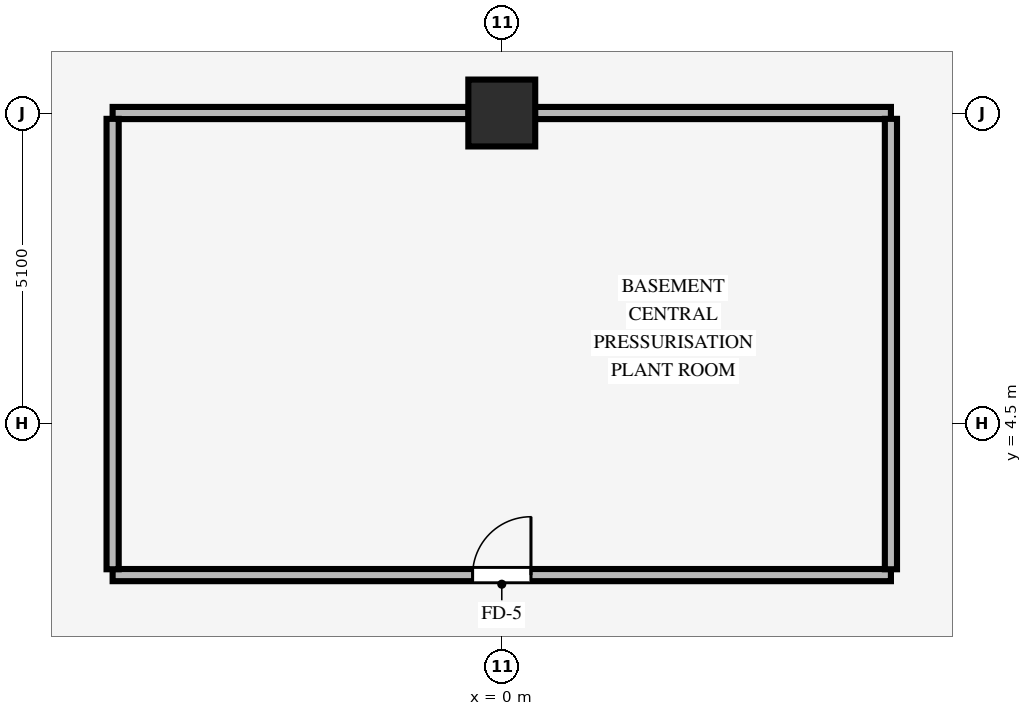
"""IFC4 building model, lengths in metres.
Left out: names, types, materials, properties, quantities, classifications, styles, units other than length and angle.
Written with IfcOpenShell. Run it as: python <this file> out.ifc"""

import sys

from ifc_helpers import new_model, si_unit, direction, frame, frame_2d, origin, origin_2d, place, context, subcontext, project, spatial, rectangle, extrude, source, transform, mapped, element, fill, save


model = new_model("IFC4")
c1 = context("Model", 3, precision=1e-05, world=origin(), true_north=direction((0.0, 1.0)))
c2 = subcontext(c1, "Body", "Model", "MODEL_VIEW")
j1 = project(units=[si_unit("LENGTHUNIT", "METRE"), si_unit("PLANEANGLEUNIT", "RADIAN")], contexts=[c1])
p1 = place(None, origin())
s1 = spatial("IfcSite", under=j1, at=p1, CompositionType="ELEMENT")
p2 = place(p1, origin())
s2 = spatial("IfcBuilding", under=s1, at=p2, CompositionType="ELEMENT")
p3 = place(p2, frame((0.0, 0.0, -8.4)))
s3 = spatial("IfcBuildingStorey", under=s2, at=p3, CompositionType="ELEMENT", Elevation=-8.4)
p4 = place(p3, frame((0.0, 9.6, 0.0), z_axis=(0.0, 0.0, 1.0), x_axis=(1.0, 0.0, 0.0)))
e1 = element("IfcColumn", 1, at=p4, inside=s3, PredefinedType="COLUMN", context=c2, shape_type="SweptSolid", body=[
    extrude(rectangle(XDim=1.1, YDim=1.1, at=origin_2d()), origin(), (0.0, 0.0, 1.0), 3.85),
])
p5 = place(p3, frame((-6.4, 2.0, 0.0), z_axis=(0.0, 0.0, 1.0), x_axis=(1.0, 0.0, 0.0)))
e2 = element("IfcWall", 2, at=p5, inside=s3, PredefinedType="STANDARD", context=c2, shape_type="SweptSolid", body=[
    extrude(rectangle(XDim=12.8, YDim=0.2, at=frame_2d((6.4, 0.0))), origin(), (0.0, 0.0, 1.0), 3.84),
])
p6 = place(p5, frame((5.92, 0.0, 0.0)))
e3 = element("IfcOpeningElement", 3, at=p6, cuts=e2, PredefinedType="OPENING", context=c2, shape_type="SweptSolid", body=[
    extrude(rectangle(XDim=0.96, YDim=2.1, at=frame_2d((0.48, 1.05))), frame((0.0, 0.11, 0.0), z_axis=(0.0, -1.0, 0.0), x_axis=(1.0, 0.0, 0.0)), (0.0, 0.0, 1.0), 0.22),
])
for number, where, z_axis, x_axis in (
    (4, (-6.4, 9.6, 0.0), (0.0, 0.0, 1.0), (1.0, 0.0, 0.0)),
    (5, (0.546, 9.6, 0.0), (0.0, 0.0, 1.0), (1.0, 0.0, 0.0)),
):
    element("IfcWall", number, at=place(p3, frame(where, z_axis=z_axis, x_axis=x_axis)), inside=s3, PredefinedType="STANDARD", context=c2, shape_type="SweptSolid", body=[
        extrude(rectangle(XDim=5.854, YDim=0.2, at=frame_2d((2.927, 0.0))), origin(), (0.0, 0.0, 1.0), 3.085),
    ])
for number, where, z_axis, x_axis in (
    (6, (-6.4, 2.096, 0.0), (0.0, 0.0, 1.0), (0.0, 1.0, 0.0)),
    (7, (6.4, 2.096, 0.0), (0.0, 0.0, 1.0), (0.0, 1.0, 0.0)),
):
    element("IfcWall", number, at=place(p3, frame(where, z_axis=z_axis, x_axis=x_axis)), inside=s3, PredefinedType="STANDARD", context=c2, shape_type="SweptSolid", body=[
        extrude(rectangle(XDim=7.408, YDim=0.2, at=frame_2d((3.704, 0.0))), origin(), (0.0, 0.0, 1.0), 3.84),
    ])
m1 = source(origin(), c2, "Body", "SweptSolid", [
    extrude(rectangle(XDim=0.96, YDim=2.1, at=frame_2d((0.48, 1.05))), frame((0.0, 0.025, 0.0), z_axis=(0.0, -1.0, 0.0), x_axis=(1.0, 0.0, 0.0)), (0.0, 0.0, 1.0), 0.05),
])
p7 = place(p6, origin())
e8 = element("IfcDoor", 8, at=p7, inside=s3, OperationType="SINGLE_SWING_RIGHT", PredefinedType="DOOR", context=c2, shape_type="MappedRepresentation", body=[
    mapped(m1, transform((0.0, 0.0, 0.0), scale=1.0)),
])
fill(e3, e8)
save(model, sys.argv[1])
